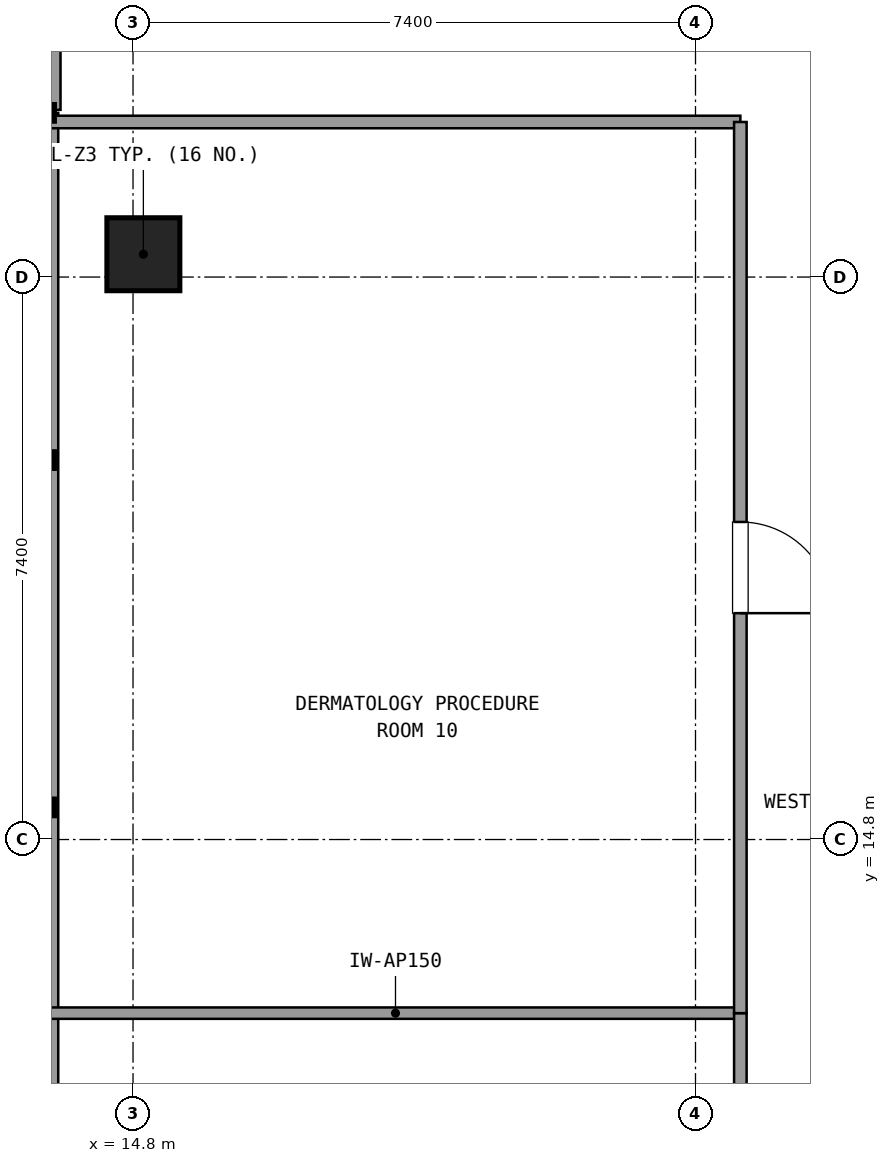
"""IFC4 building model, lengths in metres.
Left out: names, types, materials, properties, quantities, classifications, styles, units other than length and angle.
Written with IfcOpenShell. Run it as: python <this file> out.ifc"""

import sys

from ifc_helpers import new_model, si_unit, direction, frame, frame_2d, origin, origin_2d, place, context, subcontext, project, spatial, rectangle, extrude, element, fill, save


model = new_model("IFC4")
c1 = context("Model", 3, precision=1e-05, world=origin(), true_north=direction((0.0, 1.0)))
c2 = subcontext(c1, "Body", "Model", "MODEL_VIEW")
j1 = project(units=[si_unit("LENGTHUNIT", "METRE"), si_unit("PLANEANGLEUNIT", "RADIAN")], contexts=[c1])
p1 = place(None, origin())
s1 = spatial("IfcSite", under=j1, at=p1, CompositionType="ELEMENT")
p2 = place(p1, origin())
s2 = spatial("IfcBuilding", under=s1, at=p2, CompositionType="ELEMENT")
p3 = place(p2, frame((0.0, 0.0, 149.22)))
s3 = spatial("IfcBuildingStorey", under=s2, at=p3, CompositionType="ELEMENT", Elevation=149.22)
p4 = place(p3, frame((14.936, 22.5, 0.0), z_axis=(0.0, 0.0, 1.0), x_axis=(1.0, 0.0, 0.0)))
e1 = element("IfcColumn", 1, at=p4, inside=s3, PredefinedType="COLUMN", context=c2, shape_type="SweptSolid", body=[
    extrude(rectangle(XDim=0.96, YDim=0.96, at=origin_2d()), origin(), (0.0, 0.0, 1.0), 3.6),
])
p5 = place(p3, frame((13.696, 27.4, 0.0), z_axis=(0.0, 0.0, 1.0), x_axis=(0.0, -1.0, 0.0)))
e2 = element("IfcWall", 2, at=p5, inside=s3, PredefinedType="SOLIDWALL", context=c2, shape_type="SweptSolid", body=[
    extrude(rectangle(XDim=3.0, YDim=0.3, at=frame_2d((1.5, 0.0))), origin(), (0.0, 0.0, 1.0), 2.67),
])
p6 = place(p5, frame((0.9, 0.0, 0.0)))
e3 = element("IfcOpeningElement", 3, at=p6, cuts=e2, PredefinedType="OPENING", context=c2, shape_type="SweptSolid", body=[
    extrude(rectangle(XDim=1.2, YDim=2.2, at=frame_2d((0.6, 1.1))), frame((0.0, 0.16, 0.0), z_axis=(0.0, -1.0, 0.0), x_axis=(1.0, 0.0, 0.0)), (0.0, 0.0, 1.0), 0.32),
])
p7 = place(p3, frame((13.696, 24.36, 0.0), z_axis=(0.0, 0.0, 1.0), x_axis=(0.0, -1.0, 0.0)))
e4 = element("IfcWall", 4, at=p7, inside=s3, PredefinedType="SOLIDWALL", context=c2, shape_type="SweptSolid", body=[
    extrude(rectangle(XDim=13.705, YDim=0.24, at=frame_2d((6.853, 0.0))), origin(), (0.0, 0.0, 1.0), 0.85),
])
p8 = place(p3, frame((13.716, 24.24, 0.0), z_axis=(0.0, 0.0, 1.0), x_axis=(1.0, 0.0, 0.0)))
e5 = element("IfcWall", 5, at=p8, inside=s3, PredefinedType="PARTITIONING", context=c2, shape_type="SweptSolid", body=[
    extrude(rectangle(XDim=9.074, YDim=0.165, at=frame_2d((4.537, 0.0))), origin(), (0.0, 0.0, 1.0), 2.61),
])
p9 = place(p3, frame((22.79, 12.516, 0.0), z_axis=(0.0, 0.0, 1.0), x_axis=(-1.0, 0.0, 0.0)))
e6 = element("IfcWall", 6, at=p9, inside=s3, PredefinedType="PARTITIONING", context=c2, shape_type="SweptSolid", body=[
    extrude(rectangle(XDim=9.074, YDim=0.15, at=frame_2d((4.537, 0.0))), origin(), (0.0, 0.0, 1.0), 2.61),
])
p10 = place(p3, frame((22.79, 4.7, 0.0), z_axis=(0.0, 0.0, 1.0), x_axis=(0.0, 1.0, 0.0)))
e7 = element("IfcWall", 7, at=p10, inside=s3, PredefinedType="PARTITIONING", context=c2, shape_type="SweptSolid", body=[
    extrude(rectangle(XDim=7.816, YDim=0.165, at=frame_2d((3.908, 0.0))), origin(), (0.0, 0.0, 1.0), 2.61),
])
p11 = place(p10, frame((3.308, 0.0, 0.0)))
e8 = element("IfcOpeningElement", 8, at=p11, cuts=e7, PredefinedType="OPENING", context=c2, shape_type="SweptSolid", body=[
    extrude(rectangle(XDim=1.2, YDim=2.15, at=frame_2d((0.6, 1.075))), frame((0.0, 0.093, 0.0), z_axis=(0.0, -1.0, 0.0), x_axis=(1.0, 0.0, 0.0)), (0.0, 0.0, 1.0), 0.185),
])
p12 = place(p3, frame((22.79, 12.516, 0.0), z_axis=(0.0, 0.0, 1.0), x_axis=(0.0, 1.0, 0.0)))
e9 = element("IfcWall", 9, at=p12, inside=s3, PredefinedType="PARTITIONING", context=c2, shape_type="SweptSolid", body=[
    extrude(rectangle(XDim=11.724, YDim=0.165, at=frame_2d((5.862, 0.0))), origin(), (0.0, 0.0, 1.0), 2.61),
])
p13 = place(p12, frame((5.262, 0.0, 0.0)))
e10 = element("IfcOpeningElement", 10, at=p13, cuts=e9, PredefinedType="OPENING", context=c2, shape_type="SweptSolid", body=[
    extrude(rectangle(XDim=1.2, YDim=2.15, at=frame_2d((0.6, 1.075))), frame((0.0, 0.093, 0.0), z_axis=(0.0, -1.0, 0.0), x_axis=(1.0, 0.0, 0.0)), (0.0, 0.0, 1.0), 0.185),
])
p14 = place(p13, frame((1.2, 0.0, 0.0), z_axis=(0.0, 0.0, 1.0), x_axis=(-1.0, 0.0, 0.0)))
e11 = element("IfcDoor", 11, at=p14, inside=s3, OperationType="SINGLE_SWING_LEFT", PredefinedType="DOOR", context=c2, shape_type="SweptSolid", body=[
    extrude(rectangle(XDim=1.2, YDim=2.15, at=frame_2d((0.6, 1.075))), frame((0.0, 0.025, 0.0), z_axis=(0.0, -1.0, 0.0), x_axis=(1.0, 0.0, 0.0)), (0.0, 0.0, 1.0), 0.05),
])
fill(e10, e11)
save(model, sys.argv[1])
